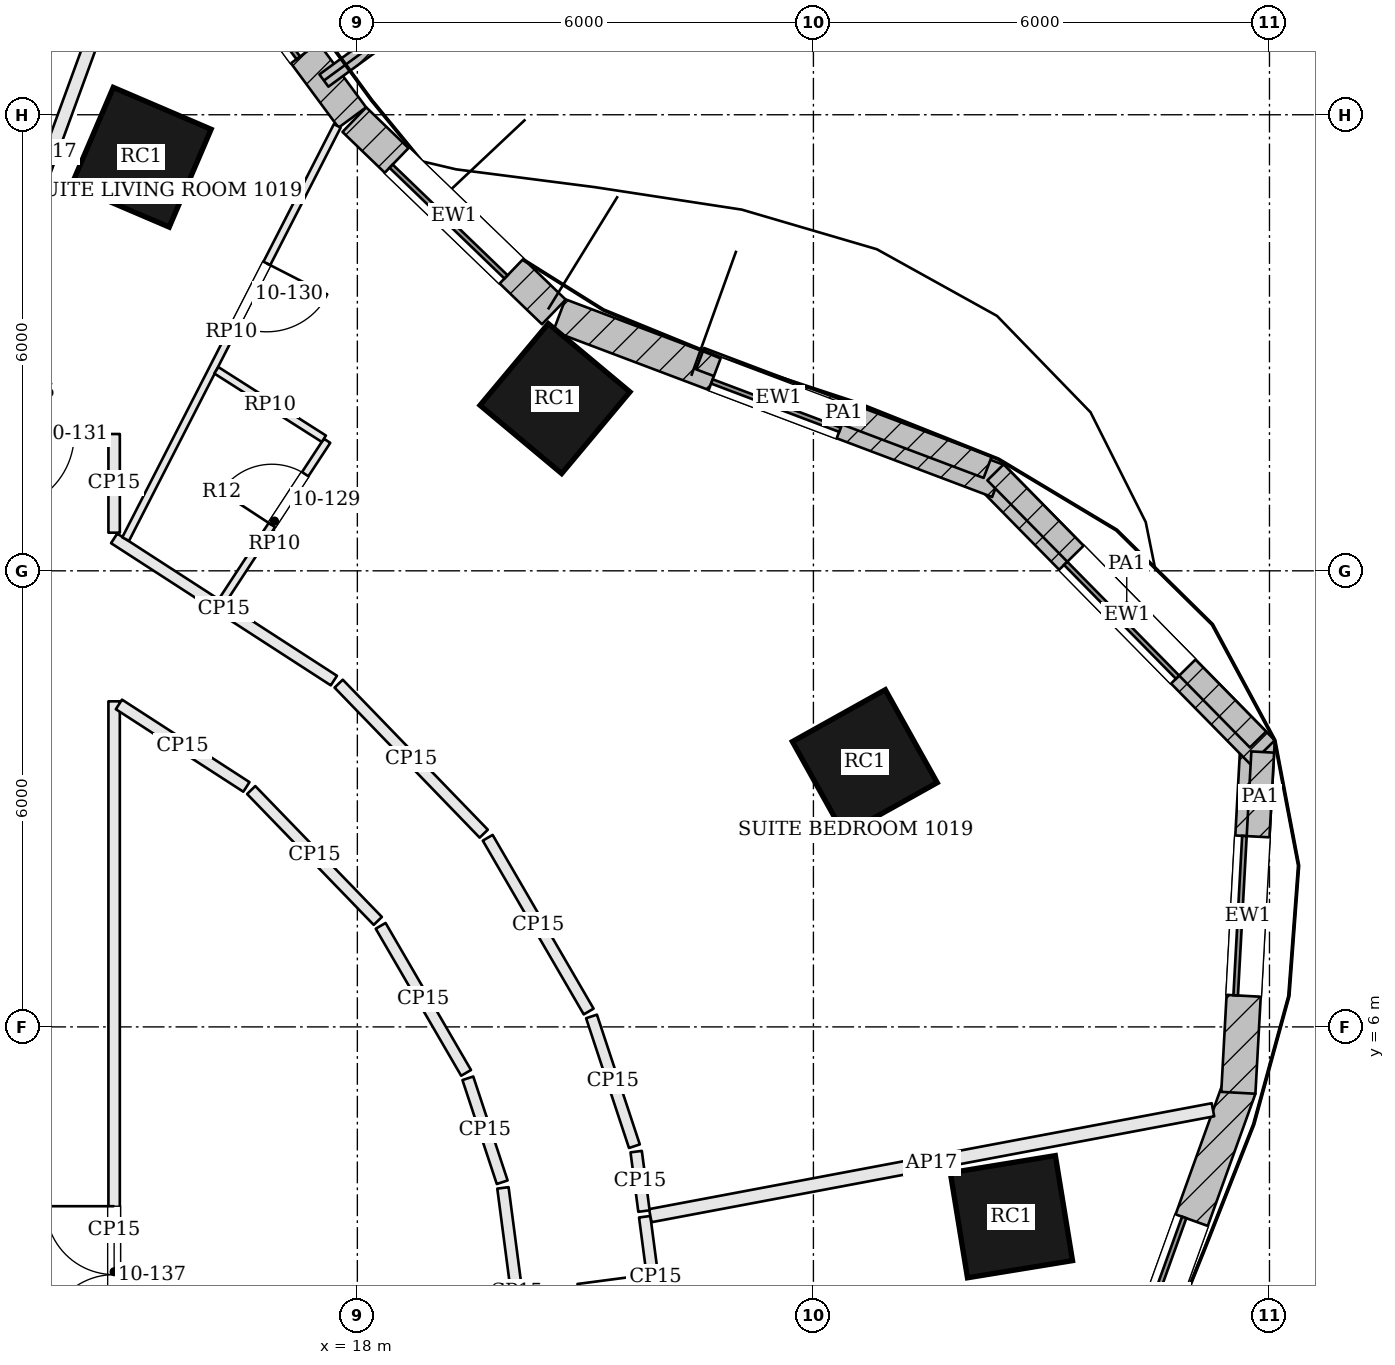
"""IFC4 building model, lengths in metres.
Left out: names, types, materials, properties, quantities, classifications, styles, units other than length and angle.
Written with IfcOpenShell. Run it as: python <this file> out.ifc"""

import sys

from ifc_helpers import new_model, si_unit, direction, frame, frame_2d, origin, origin_2d, place, context, subcontext, project, spatial, rectangle, extrude, element, fill, save


model = new_model("IFC4")
c1 = context("Model", 3, precision=1e-05, world=origin(), true_north=direction((0.0, 1.0)))
c2 = subcontext(c1, "Body", "Model", "MODEL_VIEW")
j1 = project(units=[si_unit("LENGTHUNIT", "METRE"), si_unit("PLANEANGLEUNIT", "RADIAN")], contexts=[c1])
p1 = place(None, origin())
s1 = spatial("IfcSite", under=j1, at=p1, CompositionType="ELEMENT")
p2 = place(p1, origin())
s2 = spatial("IfcBuilding", under=s1, at=p2, CompositionType="ELEMENT")
p3 = place(p2, frame((0.0, 0.0, 51.9)))
s3 = spatial("IfcBuildingStorey", under=s2, at=p3, CompositionType="ELEMENT", Elevation=51.9)
for number, where, z_axis, x_axis in (
    (1, (26.605, 3.503, 0.0), (0.0, 0.0, 1.0), (-0.161, 0.987, 0.0)),
    (2, (24.676, 9.483, 0.0), (0.0, 0.0, 1.0), (-0.487, 0.873, 0.0)),
    (3, (20.6, 14.266, 0.0), (0.0, 0.0, 1.0), (-0.767, 0.641, 0.0)),
    (4, (15.157, 17.441, 0.0), (0.0, 0.0, 1.0), (-0.919, 0.394, 0.0)),
):
    element("IfcColumn", number, at=place(p3, frame(where, z_axis=z_axis, x_axis=x_axis)), inside=s3, PredefinedType="COLUMN", context=c2, shape_type="SweptSolid", body=[
        extrude(rectangle(XDim=1.4, YDim=1.4, at=origin_2d()), origin(), (0.0, 0.0, 1.0), 3.6),
    ])
p4 = place(p3, frame((27.638, -0.257, 0.0), z_axis=(0.0, 0.0, 1.0), x_axis=(0.338914809068, 0.940817066275, 0.0)))
e5 = element("IfcWall", 5, at=p4, inside=s3, PredefinedType="SOLIDWALL", context=c2, shape_type="SweptSolid", body=[
    extrude(rectangle(XDim=5.797, YDim=0.45, at=frame_2d((2.899, 0.0))), origin(), (0.0, 0.0, 1.0), 3.4),
])
p5 = place(p4, frame((1.849, 0.0, 0.9)))
e6 = element("IfcOpeningElement", 6, at=p5, cuts=e5, PredefinedType="OPENING", context=c2, shape_type="SweptSolid", body=[
    extrude(rectangle(XDim=2.1, YDim=2.0, at=frame_2d((1.05, 1.0))), frame((0.0, 0.235, 0.0), z_axis=(0.0, -1.0, 0.0), x_axis=(1.0, 0.0, 0.0)), (0.0, 0.0, 1.0), 0.47),
])
p6 = place(p3, frame((29.59, 5.133, 0.0), z_axis=(0.0, 0.0, 1.0), x_axis=(0.054738225791, 0.998500739427, 0.0)))
e7 = element("IfcWall", 7, at=p6, inside=s3, PredefinedType="SOLIDWALL", context=c2, shape_type="SweptSolid", body=[
    extrude(rectangle(XDim=4.656, YDim=0.45, at=frame_2d((2.328, 0.0))), origin(), (0.0, 0.0, 1.0), 3.4),
])
p7 = place(p6, frame((1.278, 0.0, 0.9)))
e8 = element("IfcOpeningElement", 8, at=p7, cuts=e7, PredefinedType="OPENING", context=c2, shape_type="SweptSolid", body=[
    extrude(rectangle(XDim=2.1, YDim=2.0, at=frame_2d((1.05, 1.0))), frame((0.0, 0.235, 0.0), z_axis=(0.0, -1.0, 0.0), x_axis=(1.0, 0.0, 0.0)), (0.0, 0.0, 1.0), 0.47),
])
p8 = place(p3, frame((29.909, 9.612, 0.0), z_axis=(0.0, 0.0, 1.0), x_axis=(-0.700902433902, 0.713257161303, 0.0)))
e9 = element("IfcWall", 9, at=p8, inside=s3, PredefinedType="SOLIDWALL", context=c2, shape_type="SweptSolid", body=[
    extrude(rectangle(XDim=5.079, YDim=0.45, at=frame_2d((2.539, 0.0))), origin(), (0.0, 0.0, 1.0), 3.4),
])
p9 = place(p8, frame((1.489, 0.0, 0.9)))
e10 = element("IfcOpeningElement", 10, at=p9, cuts=e9, PredefinedType="OPENING", context=c2, shape_type="SweptSolid", body=[
    extrude(rectangle(XDim=2.1, YDim=2.0, at=frame_2d((1.05, 1.0))), frame((0.0, 0.235, 0.0), z_axis=(0.0, -1.0, 0.0), x_axis=(1.0, 0.0, 0.0)), (0.0, 0.0, 1.0), 0.47),
])
p10 = place(p3, frame((26.431, 13.182, 0.0), z_axis=(0.0, 0.0, 1.0), x_axis=(-0.935540074321, 0.35322056755, 0.0)))
e11 = element("IfcWall", 11, at=p10, inside=s3, PredefinedType="SOLIDWALL", context=c2, shape_type="SweptSolid", body=[
    extrude(rectangle(XDim=6.172, YDim=0.45, at=frame_2d((3.086, 0.0))), origin(), (0.0, 0.0, 1.0), 3.4),
])
p11 = place(p10, frame((2.186, 0.0, 0.9)))
e12 = element("IfcOpeningElement", 12, at=p11, cuts=e11, PredefinedType="OPENING", context=c2, shape_type="SweptSolid", body=[
    extrude(rectangle(XDim=1.8, YDim=2.0, at=frame_2d((0.9, 1.0))), frame((0.0, 0.235, 0.0), z_axis=(0.0, -1.0, 0.0), x_axis=(1.0, 0.0, 0.0)), (0.0, 0.0, 1.0), 0.47),
])
p12 = place(p3, frame((20.585, 15.406, 0.0), z_axis=(0.0, 0.0, 1.0), x_axis=(-0.719978118026, 0.693996764808, 0.0)))
e13 = element("IfcWall", 13, at=p12, inside=s3, PredefinedType="SOLIDWALL", context=c2, shape_type="SweptSolid", body=[
    extrude(rectangle(XDim=3.646, YDim=0.45, at=frame_2d((1.823, 0.0))), origin(), (0.0, 0.0, 1.0), 3.4),
])
p13 = place(p12, frame((0.773, 0.0, 0.9)))
e14 = element("IfcOpeningElement", 14, at=p13, cuts=e13, PredefinedType="OPENING", context=c2, shape_type="SweptSolid", body=[
    extrude(rectangle(XDim=2.1, YDim=2.0, at=frame_2d((1.05, 1.0))), frame((0.0, 0.235, 0.0), z_axis=(0.0, -1.0, 0.0), x_axis=(1.0, 0.0, 0.0)), (0.0, 0.0, 1.0), 0.47),
])
p14 = place(p3, frame((17.934, 17.964, 0.0), z_axis=(0.0, 0.0, 1.0), x_axis=(-0.594544447368, 0.804062746372, 0.0)))
e15 = element("IfcWall", 15, at=p14, inside=s3, PredefinedType="SOLIDWALL", context=c2, shape_type="SweptSolid", body=[
    extrude(rectangle(XDim=4.207, YDim=0.45, at=frame_2d((2.103, 0.0))), origin(), (0.0, 0.0, 1.0), 3.4),
])
p15 = place(p14, frame((1.053, 0.0, 0.9)))
e16 = element("IfcOpeningElement", 16, at=p15, cuts=e15, PredefinedType="OPENING", context=c2, shape_type="SweptSolid", body=[
    extrude(rectangle(XDim=2.1, YDim=2.0, at=frame_2d((1.05, 1.0))), frame((0.0, 0.235, 0.0), z_axis=(0.0, -1.0, 0.0), x_axis=(1.0, 0.0, 0.0)), (0.0, 0.0, 1.0), 0.47),
])
p16 = place(p3, frame((17.56, 18.45, 0.0), z_axis=(0.0, 0.0, 1.0), x_axis=(0.807091943364, 0.590425774299, 0.0)))
e17 = element("IfcWall", 17, at=p16, inside=s3, PredefinedType="SOLIDWALL", context=c2, shape_type="SweptSolid", body=[
    extrude(rectangle(XDim=1.75, YDim=0.2, at=frame_2d((0.875, 0.0))), origin(), (0.0, 0.0, 1.0), 3.4),
])
p17 = place(p3, frame((29.846, 8.422, 3.6), z_axis=(0.0, 0.0, 1.0), x_axis=(0.054723601839, 0.998501541011, 0.0)))
e18 = element("IfcWall", 18, at=p17, inside=s3, PredefinedType="PARAPET", context=c2, shape_type="SweptSolid", body=[
    extrude(rectangle(XDim=1.196, YDim=0.3, at=frame_2d((0.598, 0.0))), origin(), (0.0, 0.0, 1.0), 1.1),
])
p18 = place(p3, frame((29.849, 9.781, 3.6), z_axis=(0.0, 0.0, 1.0), x_axis=(-0.700911537772, 0.713248215012, 0.0)))
e19 = element("IfcWall", 19, at=p18, inside=s3, PredefinedType="PARAPET", context=c2, shape_type="SweptSolid", body=[
    extrude(rectangle(XDim=4.928, YDim=0.3, at=frame_2d((2.464, 0.0))), origin(), (0.0, 0.0, 1.0), 1.1),
])
p19 = place(p3, frame((26.292, 13.363, 3.6), z_axis=(0.0, 0.0, 1.0), x_axis=(-0.93551777481, 0.353279624397, 0.0)))
e20 = element("IfcWall", 20, at=p19, inside=s3, PredefinedType="PARAPET", context=c2, shape_type="SweptSolid", body=[
    extrude(rectangle(XDim=4.043, YDim=0.3, at=frame_2d((2.022, 0.0))), origin(), (0.0, 0.0, 1.0), 1.1),
])
p20 = place(p3, frame((22.068, 1.309, 0.0), z_axis=(0.0, 0.0, 1.0), x_axis=(-0.129886420754, 0.991528878906, 0.0)))
e21 = element("IfcWall", 21, at=p20, inside=s3, PredefinedType="PARTITIONING", context=c2, shape_type="SweptSolid", body=[
    extrude(rectangle(XDim=2.212, YDim=0.15, at=frame_2d((1.106, 0.0))), origin(), (0.0, 0.0, 1.0), 2.68),
])
p21 = place(p20, frame((0.45, 0.0, 0.0)))
e22 = element("IfcOpeningElement", 22, at=p21, cuts=e21, PredefinedType="OPENING", context=c2, shape_type="SweptSolid", body=[
    extrude(rectangle(XDim=1.0, YDim=2.1, at=frame_2d((0.5, 1.05))), frame((0.0, 0.085, 0.0), z_axis=(0.0, -1.0, 0.0), x_axis=(1.0, 0.0, 0.0)), (0.0, 0.0, 1.0), 0.17),
])
p22 = place(p3, frame((29.257, 4.91, 0.0), z_axis=(0.0, 0.0, 1.0), x_axis=(-0.982749785581, -0.184940149617, 0.0)))
e23 = element("IfcWall", 23, at=p22, inside=s3, PredefinedType="PARTITIONING", context=c2, shape_type="SweptSolid", body=[
    extrude(rectangle(XDim=7.532, YDim=0.175, at=frame_2d((3.766, 0.0))), origin(), (0.0, 0.0, 1.0), 2.68),
])
p23 = place(p3, frame((21.771, 3.577, 0.0), z_axis=(0.0, 0.0, 1.0), x_axis=(-0.129974188098, 0.991517377774, 0.0)))
e24 = element("IfcWall", 24, at=p23, inside=s3, PredefinedType="PARTITIONING", context=c2, shape_type="SweptSolid", body=[
    extrude(rectangle(XDim=0.789, YDim=0.15, at=frame_2d((0.395, 0.0))), origin(), (0.0, 0.0, 1.0), 2.68),
])
p24 = place(p3, frame((21.645, 4.43, 0.0), z_axis=(0.0, 0.0, 1.0), x_axis=(-0.313700743044, 0.949521902756, 0.0)))
e25 = element("IfcWall", 25, at=p24, inside=s3, PredefinedType="PARTITIONING", context=c2, shape_type="SweptSolid", body=[
    extrude(rectangle(XDim=1.798, YDim=0.15, at=frame_2d((0.899, 0.0))), origin(), (0.0, 0.0, 1.0), 2.68),
])
p25 = place(p3, frame((21.043, 6.202, 0.0), z_axis=(0.0, 0.0, 1.0), x_axis=(-0.502371650135, 0.864651794158, 0.0)))
e26 = element("IfcWall", 26, at=p25, inside=s3, PredefinedType="PARTITIONING", context=c2, shape_type="SweptSolid", body=[
    extrude(rectangle(XDim=2.644, YDim=0.15, at=frame_2d((1.322, 0.0))), origin(), (0.0, 0.0, 1.0), 2.68),
])
p26 = place(p3, frame((19.663, 8.542, 0.0), z_axis=(0.0, 0.0, 1.0), x_axis=(-0.695225869021, 0.718791340407, 0.0)))
e27 = element("IfcWall", 27, at=p26, inside=s3, PredefinedType="PARTITIONING", context=c2, shape_type="SweptSolid", body=[
    extrude(rectangle(XDim=2.745, YDim=0.15, at=frame_2d((1.373, 0.0))), origin(), (0.0, 0.0, 1.0), 2.68),
])
p27 = place(p3, frame((17.691, 10.556, 0.0), z_axis=(0.0, 0.0, 1.0), x_axis=(-0.839564450265, 0.54326009779, 0.0)))
e28 = element("IfcWall", 28, at=p27, inside=s3, PredefinedType="PARTITIONING", context=c2, shape_type="SweptSolid", body=[
    extrude(rectangle(XDim=3.443, YDim=0.15, at=frame_2d((1.722, 0.0))), origin(), (0.0, 0.0, 1.0), 2.68),
])
p28 = place(p3, frame((14.8, 12.502, 0.0), z_axis=(0.0, 0.0, 1.0), x_axis=(-0.000188040613, 0.99999998232, 0.0)))
e29 = element("IfcWall", 29, at=p28, inside=s3, PredefinedType="PARTITIONING", context=c2, shape_type="SweptSolid", body=[
    extrude(rectangle(XDim=1.298, YDim=0.15, at=frame_2d((0.649, 0.0))), origin(), (0.0, 0.0, 1.0), 2.68),
])
p29 = place(p3, frame((14.725, 13.8, 0.0), z_axis=(0.0, 0.0, 1.0), x_axis=(-1.0, 0.0, 0.0)))
e30 = element("IfcWall", 30, at=p29, inside=s3, PredefinedType="PARTITIONING", context=c2, shape_type="SweptSolid", body=[
    extrude(rectangle(XDim=2.108, YDim=0.15, at=frame_2d((1.054, 0.0))), origin(), (0.0, 0.0, 1.0), 2.68),
])
p30 = place(p29, frame((0.45, 0.0, 0.0)))
e31 = element("IfcOpeningElement", 31, at=p30, cuts=e30, PredefinedType="OPENING", context=c2, shape_type="SweptSolid", body=[
    extrude(rectangle(XDim=1.0, YDim=2.1, at=frame_2d((0.5, 1.05))), frame((0.0, 0.085, 0.0), z_axis=(0.0, -1.0, 0.0), x_axis=(1.0, 0.0, 0.0)), (0.0, 0.0, 1.0), 0.17),
])
p31 = place(p3, frame((15.299, 21.143, 0.0), z_axis=(0.0, 0.0, 1.0), x_axis=(-0.343006226001, -0.939333129898, 0.0)))
e32 = element("IfcWall", 32, at=p31, inside=s3, PredefinedType="PARTITIONING", context=c2, shape_type="SweptSolid", body=[
    extrude(rectangle(XDim=7.742, YDim=0.175, at=frame_2d((3.871, 0.0))), origin(), (0.0, 0.0, 1.0), 2.68),
])
p32 = place(p3, frame((16.604, 9.116, 0.0), z_axis=(0.0, 0.0, 1.0), x_axis=(0.695185405932, -0.718830474716, 0.0)))
e33 = element("IfcWall", 33, at=p32, inside=s3, PredefinedType="PARTITIONING", context=c2, shape_type="SweptSolid", body=[
    extrude(rectangle(XDim=2.396, YDim=0.15, at=frame_2d((1.198, 0.0))), origin(), (0.0, 0.0, 1.0), 2.68),
])
p33 = place(p3, frame((18.306, 7.329, 0.0), z_axis=(0.0, 0.0, 1.0), x_axis=(0.502425081691, -0.864620747662, 0.0)))
e34 = element("IfcWall", 34, at=p33, inside=s3, PredefinedType="PARTITIONING", context=c2, shape_type="SweptSolid", body=[
    extrude(rectangle(XDim=2.237, YDim=0.15, at=frame_2d((1.119, 0.0))), origin(), (0.0, 0.0, 1.0), 2.68),
])
p34 = place(p3, frame((19.454, 5.324, 0.0), z_axis=(0.0, 0.0, 1.0), x_axis=(0.313632756375, -0.949544361327, 0.0)))
e35 = element("IfcWall", 35, at=p34, inside=s3, PredefinedType="PARTITIONING", context=c2, shape_type="SweptSolid", body=[
    extrude(rectangle(XDim=1.44, YDim=0.15, at=frame_2d((0.72, 0.0))), origin(), (0.0, 0.0, 1.0), 2.68),
])
p35 = place(p3, frame((19.915, 3.882, 0.0), z_axis=(0.0, 0.0, 1.0), x_axis=(0.129945947446, -0.991521079323, 0.0)))
e36 = element("IfcWall", 36, at=p35, inside=s3, PredefinedType="PARTITIONING", context=c2, shape_type="SweptSolid", body=[
    extrude(rectangle(XDim=2.769, YDim=0.15, at=frame_2d((1.385, 0.0))), origin(), (0.0, 0.0, 1.0), 2.68),
])
p36 = place(p3, frame((14.8, -4.725, 0.0), z_axis=(0.0, 0.0, 1.0), x_axis=(0.0, 1.0, 0.0)))
e37 = element("IfcWall", 37, at=p36, inside=s3, PredefinedType="PARTITIONING", context=c2, shape_type="SweptSolid", body=[
    extrude(rectangle(XDim=15.008, YDim=0.15, at=frame_2d((7.504, 0.0))), origin(), (0.0, 0.0, 1.0), 2.68),
])
p37 = place(p36, frame((6.566, 0.0, 0.0)))
e38 = element("IfcOpeningElement", 38, at=p37, cuts=e37, PredefinedType="OPENING", context=c2, shape_type="SweptSolid", body=[
    extrude(rectangle(XDim=1.8, YDim=2.1, at=frame_2d((0.9, 1.05))), frame((0.0, 0.085, 0.0), z_axis=(0.0, -1.0, 0.0), x_axis=(1.0, 0.0, 0.0)), (0.0, 0.0, 1.0), 0.17),
])
p38 = place(p3, frame((14.863, 10.242, 0.0), z_axis=(0.0, 0.0, 1.0), x_axis=(0.839530811724, -0.543312079901, 0.0)))
e39 = element("IfcWall", 39, at=p38, inside=s3, PredefinedType="PARTITIONING", context=c2, shape_type="SweptSolid", body=[
    extrude(rectangle(XDim=1.998, YDim=0.15, at=frame_2d((0.999, 0.0))), origin(), (0.0, 0.0, 1.0), 2.68),
])
p39 = place(p3, frame((17.736, 17.854, 0.0), z_axis=(0.0, 0.0, 1.0), x_axis=(-0.455842659808, -0.890060374075, 0.0)))
e40 = element("IfcWall", 40, at=p39, inside=s3, PredefinedType="PARTITIONING", context=c2, shape_type="SweptSolid", body=[
    extrude(rectangle(XDim=6.108, YDim=0.1, at=frame_2d((3.054, 0.0))), origin(), (0.0, 0.0, 1.0), 2.898),
])
p40 = place(p39, frame((2.033, 0.0, 0.0)))
e41 = element("IfcOpeningElement", 41, at=p40, cuts=e40, PredefinedType="OPENING", context=c2, shape_type="SweptSolid", body=[
    extrude(rectangle(XDim=0.9, YDim=2.4, at=frame_2d((0.45, 1.2))), frame((0.0, 0.06, 0.0), z_axis=(0.0, -1.0, 0.0), x_axis=(1.0, 0.0, 0.0)), (0.0, 0.0, 1.0), 0.12),
])
p41 = place(p3, frame((16.218, 11.599, 0.0), z_axis=(0.0, 0.0, 1.0), x_axis=(0.547988935577, 0.83648558056, 0.0)))
e42 = element("IfcWall", 42, at=p41, inside=s3, PredefinedType="PARTITIONING", context=c2, shape_type="SweptSolid", body=[
    extrude(rectangle(XDim=2.525, YDim=0.1, at=frame_2d((1.263, 0.0))), origin(), (0.0, 0.0, 1.0), 2.898),
])
p42 = place(p41, frame((1.2, 0.0, 0.0)))
e43 = element("IfcOpeningElement", 43, at=p42, cuts=e42, PredefinedType="OPENING", context=c2, shape_type="SweptSolid", body=[
    extrude(rectangle(XDim=0.8, YDim=2.1, at=frame_2d((0.4, 1.05))), frame((0.0, 0.06, 0.0), z_axis=(0.0, -1.0, 0.0), x_axis=(1.0, 0.0, 0.0)), (0.0, 0.0, 1.0), 0.12),
])
p43 = place(p3, frame((17.56, 13.738, 0.0), z_axis=(0.0, 0.0, 1.0), x_axis=(-0.843601529877, 0.536969700067, 0.0)))
e44 = element("IfcWall", 44, at=p43, inside=s3, PredefinedType="PARTITIONING", context=c2, shape_type="SweptSolid", body=[
    extrude(rectangle(XDim=1.677, YDim=0.1, at=frame_2d((0.838, 0.0))), origin(), (0.0, 0.0, 1.0), 2.898),
])
p44 = place(p5, origin())
e45 = element("IfcWindow", 45, at=p44, inside=s3, PartitioningType="SINGLE_PANEL", PredefinedType="WINDOW", context=c2, shape_type="SweptSolid", body=[
    extrude(rectangle(XDim=2.1, YDim=2.0, at=frame_2d((1.05, 1.0))), frame((0.0, 0.135, 0.0), z_axis=(0.0, -1.0, 0.0), x_axis=(1.0, 0.0, 0.0)), (0.0, 0.0, 1.0), 0.06),
])
fill(e6, e45)
p45 = place(p7, origin())
e46 = element("IfcWindow", 46, at=p45, inside=s3, PartitioningType="SINGLE_PANEL", PredefinedType="WINDOW", context=c2, shape_type="SweptSolid", body=[
    extrude(rectangle(XDim=2.1, YDim=2.0, at=frame_2d((1.05, 1.0))), frame((0.0, 0.135, 0.0), z_axis=(0.0, -1.0, 0.0), x_axis=(1.0, 0.0, 0.0)), (0.0, 0.0, 1.0), 0.06),
])
fill(e8, e46)
p46 = place(p9, origin())
e47 = element("IfcWindow", 47, at=p46, inside=s3, PartitioningType="SINGLE_PANEL", PredefinedType="WINDOW", context=c2, shape_type="SweptSolid", body=[
    extrude(rectangle(XDim=2.1, YDim=2.0, at=frame_2d((1.05, 1.0))), frame((0.0, 0.135, 0.0), z_axis=(0.0, -1.0, 0.0), x_axis=(1.0, 0.0, 0.0)), (0.0, 0.0, 1.0), 0.06),
])
fill(e10, e47)
p47 = place(p11, origin())
e48 = element("IfcWindow", 48, at=p47, inside=s3, PartitioningType="SINGLE_PANEL", PredefinedType="WINDOW", context=c2, shape_type="SweptSolid", body=[
    extrude(rectangle(XDim=1.8, YDim=2.0, at=frame_2d((0.9, 1.0))), frame((0.0, 0.135, 0.0), z_axis=(0.0, -1.0, 0.0), x_axis=(1.0, 0.0, 0.0)), (0.0, 0.0, 1.0), 0.06),
])
fill(e12, e48)
p48 = place(p13, origin())
e49 = element("IfcWindow", 49, at=p48, inside=s3, PartitioningType="SINGLE_PANEL", PredefinedType="WINDOW", context=c2, shape_type="SweptSolid", body=[
    extrude(rectangle(XDim=2.1, YDim=2.0, at=frame_2d((1.05, 1.0))), frame((0.0, 0.135, 0.0), z_axis=(0.0, -1.0, 0.0), x_axis=(1.0, 0.0, 0.0)), (0.0, 0.0, 1.0), 0.06),
])
fill(e14, e49)
p49 = place(p15, origin())
e50 = element("IfcWindow", 50, at=p49, inside=s3, PartitioningType="SINGLE_PANEL", PredefinedType="WINDOW", context=c2, shape_type="SweptSolid", body=[
    extrude(rectangle(XDim=2.1, YDim=2.0, at=frame_2d((1.05, 1.0))), frame((0.0, 0.135, 0.0), z_axis=(0.0, -1.0, 0.0), x_axis=(1.0, 0.0, 0.0)), (0.0, 0.0, 1.0), 0.06),
])
fill(e16, e50)
p50 = place(p21, origin())
e51 = element("IfcDoor", 51, at=p50, inside=s3, OperationType="SINGLE_SWING_RIGHT", PredefinedType="DOOR", context=c2, shape_type="SweptSolid", body=[
    extrude(rectangle(XDim=1.0, YDim=2.1, at=frame_2d((0.5, 1.05))), frame((0.0, 0.025, 0.0), z_axis=(0.0, -1.0, 0.0), x_axis=(1.0, 0.0, 0.0)), (0.0, 0.0, 1.0), 0.05),
])
fill(e22, e51)
p51 = place(p42, origin())
e52 = element("IfcDoor", 52, at=p51, inside=s3, OperationType="SINGLE_SWING_LEFT", PredefinedType="DOOR", context=c2, shape_type="SweptSolid", body=[
    extrude(rectangle(XDim=0.8, YDim=2.1, at=frame_2d((0.4, 1.05))), frame((0.0, 0.025, 0.0), z_axis=(0.0, -1.0, 0.0), x_axis=(1.0, 0.0, 0.0)), (0.0, 0.0, 1.0), 0.05),
])
fill(e43, e52)
p52 = place(p40, origin())
e53 = element("IfcDoor", 53, at=p52, inside=s3, OperationType="SINGLE_SWING_LEFT", PredefinedType="DOOR", context=c2, shape_type="SweptSolid", body=[
    extrude(rectangle(XDim=0.9, YDim=2.4, at=frame_2d((0.45, 1.2))), frame((0.0, 0.025, 0.0), z_axis=(0.0, -1.0, 0.0), x_axis=(1.0, 0.0, 0.0)), (0.0, 0.0, 1.0), 0.05),
])
fill(e41, e53)
p53 = place(p30, origin())
e54 = element("IfcDoor", 54, at=p53, inside=s3, OperationType="SINGLE_SWING_RIGHT", PredefinedType="DOOR", context=c2, shape_type="SweptSolid", body=[
    extrude(rectangle(XDim=1.0, YDim=2.1, at=frame_2d((0.5, 1.05))), frame((0.0, 0.025, 0.0), z_axis=(0.0, -1.0, 0.0), x_axis=(1.0, 0.0, 0.0)), (0.0, 0.0, 1.0), 0.05),
])
fill(e31, e54)
p54 = place(p37, origin())
e55 = element("IfcDoor", 55, at=p54, inside=s3, OperationType="DOUBLE_DOOR_SINGLE_SWING", PredefinedType="DOOR", context=c2, shape_type="SweptSolid", body=[
    extrude(rectangle(XDim=1.8, YDim=2.1, at=frame_2d((0.9, 1.05))), frame((0.0, 0.025, 0.0), z_axis=(0.0, -1.0, 0.0), x_axis=(1.0, 0.0, 0.0)), (0.0, 0.0, 1.0), 0.05),
])
fill(e38, e55)
save(model, sys.argv[1])
